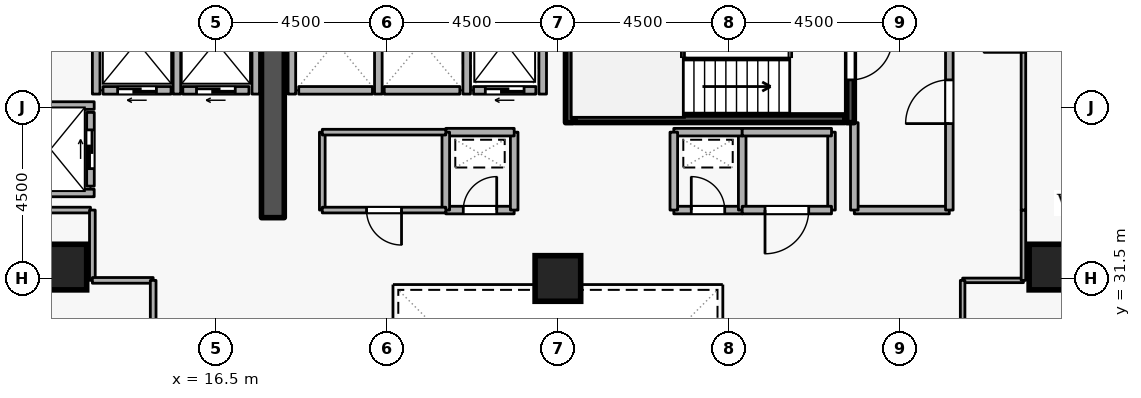
"""IFC4 building model, lengths in metres.
Left out: names, types, materials, properties, quantities, classifications, styles, units other than length and angle.
Written with IfcOpenShell. Run it as: python <this file> out.ifc"""

import sys

from ifc_helpers import new_model, si_unit, direction, frame, frame_2d, origin, origin_2d, place, context, subcontext, project, spatial, rectangle, extrude, element, fill, save


model = new_model("IFC4")
c1 = context("Model", 3, precision=1e-05, world=origin(), true_north=direction((0.0, 1.0)))
c2 = subcontext(c1, "Body", "Model", "MODEL_VIEW")
j1 = project(units=[si_unit("LENGTHUNIT", "METRE"), si_unit("PLANEANGLEUNIT", "RADIAN")], contexts=[c1])
p1 = place(None, origin())
s1 = spatial("IfcSite", under=j1, at=p1, CompositionType="ELEMENT")
p2 = place(p1, origin())
s2 = spatial("IfcBuilding", under=s1, at=p2, CompositionType="ELEMENT")
p3 = place(p2, frame((0.0, 0.0, 80.1)))
s3 = spatial("IfcBuildingStorey", under=s2, at=p3, CompositionType="ELEMENT", Elevation=80.1)
p4 = place(p3, frame((18.0, 33.1, 0.0), z_axis=(0.0, 0.0, 1.0), x_axis=(0.0, 1.0, 0.0)))
e1 = element("IfcWall", 1, at=p4, inside=s3, PredefinedType="SHEAR", context=c2, shape_type="SweptSolid", body=[
    extrude(rectangle(XDim=5.7, YDim=0.6, at=frame_2d((2.85, 0.0))), origin(), (0.0, 0.0, 1.0), 3.6),
])
for number, where, z_axis, x_axis in (
    (2, (12.5, 31.8, 0.0), (0.0, 0.0, 1.0), (1.0, 0.0, 0.0)),
    (3, (38.5, 31.8, 0.0), (0.0, 0.0, 1.0), (1.0, 0.0, 0.0)),
    (4, (25.5, 31.5, 0.0), (0.0, 0.0, 1.0), (1.0, 0.0, 0.0)),
):
    element("IfcColumn", number, at=place(p3, frame(where, z_axis=z_axis, x_axis=x_axis)), inside=s3, PredefinedType="COLUMN", context=c2, shape_type="SweptSolid", body=[
        extrude(rectangle(XDim=1.2, YDim=1.2, at=origin_2d()), origin(), (0.0, 0.0, 1.0), 3.6),
    ])
p5 = place(p3, frame((24.92, 36.45, 0.0), z_axis=(0.0, 0.0, 1.0), x_axis=(-1.0, 0.0, 0.0)))
e5 = element("IfcWall", 5, at=p5, inside=s3, PredefinedType="STANDARD", context=c2, shape_type="SweptSolid", body=[
    extrude(rectangle(XDim=1.64, YDim=0.2, at=frame_2d((0.82, 0.0))), origin(), (0.0, 0.0, 1.0), 3.34),
])
p6 = place(p5, frame((0.31, 0.0, 0.0)))
e6 = element("IfcOpeningElement", 6, at=p6, cuts=e5, PredefinedType="OPENING", context=c2, shape_type="SweptSolid", body=[
    extrude(rectangle(XDim=1.02, YDim=2.06, at=frame_2d((0.51, 1.03))), frame((0.0, 0.11, 0.0), z_axis=(0.0, -1.0, 0.0), x_axis=(1.0, 0.0, 0.0)), (0.0, 0.0, 1.0), 0.22),
])
p7 = place(p3, frame((22.92, 36.45, 0.0), z_axis=(0.0, 0.0, 1.0), x_axis=(-1.0, 0.0, 0.0)))
e7 = element("IfcWall", 7, at=p7, inside=s3, PredefinedType="STANDARD", context=c2, shape_type="SweptSolid", body=[
    extrude(rectangle(XDim=1.99, YDim=0.2, at=frame_2d((0.995, 0.0))), origin(), (0.0, 0.0, 1.0), 3.34),
])
p8 = place(p3, frame((20.62, 36.45, 0.0), z_axis=(0.0, 0.0, 1.0), x_axis=(-1.0, 0.0, 0.0)))
e8 = element("IfcWall", 8, at=p8, inside=s3, PredefinedType="STANDARD", context=c2, shape_type="SweptSolid", body=[
    extrude(rectangle(XDim=1.94, YDim=0.2, at=frame_2d((0.97, 0.0))), origin(), (0.0, 0.0, 1.0), 3.34),
])
p9 = place(p3, frame((17.37, 36.45, 0.0), z_axis=(0.0, 0.0, 1.0), x_axis=(-1.0, 0.0, 0.0)))
e9 = element("IfcWall", 9, at=p9, inside=s3, PredefinedType="STANDARD", context=c2, shape_type="SweptSolid", body=[
    extrude(rectangle(XDim=1.74, YDim=0.2, at=frame_2d((0.87, 0.0))), origin(), (0.0, 0.0, 1.0), 3.34),
])
p10 = place(p9, frame((0.36, 0.0, 0.0)))
e10 = element("IfcOpeningElement", 10, at=p10, cuts=e9, PredefinedType="OPENING", context=c2, shape_type="SweptSolid", body=[
    extrude(rectangle(XDim=1.02, YDim=2.06, at=frame_2d((0.51, 1.03))), frame((0.0, 0.11, 0.0), z_axis=(0.0, -1.0, 0.0), x_axis=(1.0, 0.0, 0.0)), (0.0, 0.0, 1.0), 0.22),
])
p11 = place(p3, frame((15.32, 36.45, 0.0), z_axis=(0.0, 0.0, 1.0), x_axis=(-1.0, 0.0, 0.0)))
e11 = element("IfcWall", 11, at=p11, inside=s3, PredefinedType="STANDARD", context=c2, shape_type="SweptSolid", body=[
    extrude(rectangle(XDim=1.79, YDim=0.2, at=frame_2d((0.895, 0.0))), origin(), (0.0, 0.0, 1.0), 3.34),
])
p12 = place(p11, frame((0.385, 0.0, 0.0)))
e12 = element("IfcOpeningElement", 12, at=p12, cuts=e11, PredefinedType="OPENING", context=c2, shape_type="SweptSolid", body=[
    extrude(rectangle(XDim=1.02, YDim=2.06, at=frame_2d((0.51, 1.03))), frame((0.0, 0.11, 0.0), z_axis=(0.0, -1.0, 0.0), x_axis=(1.0, 0.0, 0.0)), (0.0, 0.0, 1.0), 0.22),
])
p13 = place(p3, frame((13.2, 33.93, 0.0), z_axis=(0.0, 0.0, 1.0), x_axis=(0.0, 1.0, 0.0)))
e13 = element("IfcWall", 13, at=p13, inside=s3, PredefinedType="STANDARD", context=c2, shape_type="SweptSolid", body=[
    extrude(rectangle(XDim=1.94, YDim=0.2, at=frame_2d((0.97, 0.0))), origin(), (0.0, 0.0, 1.0), 3.34),
])
p14 = place(p13, frame((0.46, 0.0, 0.0)))
e14 = element("IfcOpeningElement", 14, at=p14, cuts=e13, PredefinedType="OPENING", context=c2, shape_type="SweptSolid", body=[
    extrude(rectangle(XDim=1.02, YDim=2.06, at=frame_2d((0.51, 1.03))), frame((0.0, 0.11, 0.0), z_axis=(0.0, -1.0, 0.0), x_axis=(1.0, 0.0, 0.0)), (0.0, 0.0, 1.0), 0.22),
])
for number, where, z_axis, x_axis in (
    (15, (25.1, 36.352, 0.0), (0.0, 0.0, 1.0), (0.0, 1.0, 0.0)),
    (16, (23.1, 36.352, 0.0), (0.0, 0.0, 1.0), (0.0, 1.0, 0.0)),
    (17, (20.775, 36.352, 0.0), (0.0, 0.0, 1.0), (0.0, 1.0, 0.0)),
    (18, (18.5, 36.352, 0.0), (0.0, 0.0, 1.0), (0.0, 1.0, 0.0)),
):
    element("IfcWall", number, at=place(p3, frame(where, z_axis=z_axis, x_axis=x_axis)), inside=s3, PredefinedType="STANDARD", context=c2, shape_type="SweptSolid", body=[
        extrude(rectangle(XDim=2.436, YDim=0.2, at=frame_2d((1.218, 0.0))), origin(), (0.0, 0.0, 1.0), 3.34),
    ])
p15 = place(p3, frame((17.55, 36.352, 0.0), z_axis=(0.0, 0.0, 1.0), x_axis=(0.0, 1.0, 0.0)))
e19 = element("IfcWall", 19, at=p15, inside=s3, PredefinedType="STANDARD", context=c2, shape_type="SweptSolid", body=[
    extrude(rectangle(XDim=2.636, YDim=0.2, at=frame_2d((1.318, 0.0))), origin(), (0.0, 0.0, 1.0), 2.545),
])
for number, where, z_axis, x_axis in (
    (20, (15.475, 36.352, 0.0), (0.0, 0.0, 1.0), (0.0, 1.0, 0.0)),
    (21, (13.35, 36.352, 0.0), (0.0, 0.0, 1.0), (0.0, 1.0, 0.0)),
):
    element("IfcWall", number, at=place(p3, frame(where, z_axis=z_axis, x_axis=x_axis)), inside=s3, PredefinedType="STANDARD", context=c2, shape_type="SweptSolid", body=[
        extrude(rectangle(XDim=2.636, YDim=0.2, at=frame_2d((1.318, 0.0))), origin(), (0.0, 0.0, 1.0), 3.34),
    ])
for number, where, z_axis, x_axis in (
    (22, (11.002, 36.05, 0.0), (0.0, 0.0, 1.0), (1.0, 0.0, 0.0)),
    (23, (11.002, 33.75, 0.0), (0.0, 0.0, 1.0), (1.0, 0.0, 0.0)),
):
    element("IfcWall", number, at=place(p3, frame(where, z_axis=z_axis, x_axis=x_axis)), inside=s3, PredefinedType="STANDARD", context=c2, shape_type="SweptSolid", body=[
        extrude(rectangle(XDim=2.296, YDim=0.2, at=frame_2d((1.148, 0.0))), origin(), (0.0, 0.0, 1.0), 3.34),
    ])
p16 = place(p3, frame((33.2, 38.95, 0.0), z_axis=(0.0, 0.0, 1.0), x_axis=(0.0, -1.0, 0.0)))
e24 = element("IfcWall", 24, at=p16, inside=s3, PredefinedType="SHEAR", context=c2, shape_type="SweptSolid", body=[
    extrude(rectangle(XDim=3.35, YDim=0.2, at=frame_2d((1.675, 0.0))), origin(), (0.0, 0.0, 1.0), 3.6),
])
p17 = place(p16, frame((1.125, 0.0, 0.0)))
e25 = element("IfcOpeningElement", 25, at=p17, cuts=e24, PredefinedType="OPENING", context=c2, shape_type="SweptSolid", body=[
    extrude(rectangle(XDim=1.1, YDim=2.1, at=frame_2d((0.55, 1.05))), frame((0.0, 0.11, 0.0), z_axis=(0.0, -1.0, 0.0), x_axis=(1.0, 0.0, 0.0)), (0.0, 0.0, 1.0), 0.22),
])
p18 = place(p3, frame((25.8, 35.6, 0.0), z_axis=(0.0, 0.0, 1.0), x_axis=(0.0, 1.0, 0.0)))
e26 = element("IfcWall", 26, at=p18, inside=s3, PredefinedType="SHEAR", context=c2, shape_type="SweptSolid", body=[
    extrude(rectangle(XDim=3.35, YDim=0.2, at=frame_2d((1.675, 0.0))), origin(), (0.0, 0.0, 1.0), 3.6),
])
p19 = place(p3, frame((25.95, 35.703, 0.0), z_axis=(0.0, 0.0, 1.0), x_axis=(1.0, 0.0, 0.0)))
e27 = element("IfcWall", 27, at=p19, inside=s3, PredefinedType="SHEAR", context=c2, shape_type="SweptSolid", body=[
    extrude(rectangle(XDim=7.1, YDim=0.2, at=frame_2d((3.55, 0.0))), origin(), (0.0, 0.0, 1.0), 3.6),
])
p20 = place(p3, frame((33.3, 33.3, 0.0), z_axis=(0.0, 0.0, 1.0), x_axis=(1.0, 0.0, 0.0)))
e28 = element("IfcWall", 28, at=p20, inside=s3, PredefinedType="STANDARD", context=c2, shape_type="SweptSolid", body=[
    extrude(rectangle(XDim=2.5, YDim=0.2, at=frame_2d((1.25, 0.0))), origin(), (0.0, 0.0, 1.0), 3.34),
])
p21 = place(p3, frame((35.8, 33.3, 0.0), z_axis=(0.0, 0.0, 1.0), x_axis=(0.0, 1.0, 0.0)))
e29 = element("IfcWall", 29, at=p21, inside=s3, PredefinedType="STANDARD", context=c2, shape_type="SweptSolid", body=[
    extrude(rectangle(XDim=5.7, YDim=0.2, at=frame_2d((2.85, 0.0))), origin(), (0.0, 0.0, 1.0), 3.34),
])
p22 = place(p21, frame((2.275, 0.0, 0.0)))
e30 = element("IfcOpeningElement", 30, at=p22, cuts=e29, PredefinedType="OPENING", context=c2, shape_type="SweptSolid", body=[
    extrude(rectangle(XDim=1.15, YDim=2.1, at=frame_2d((0.575, 1.05))), frame((0.0, 0.11, 0.0), z_axis=(0.0, -1.0, 0.0), x_axis=(1.0, 0.0, 0.0)), (0.0, 0.0, 1.0), 0.22),
])
p23 = place(p3, frame((33.3, 35.6, 0.0), z_axis=(0.0, 0.0, 1.0), x_axis=(0.0, -1.0, 0.0)))
e31 = element("IfcWall", 31, at=p23, inside=s3, PredefinedType="STANDARD", context=c2, shape_type="SweptSolid", body=[
    extrude(rectangle(XDim=2.3, YDim=0.2, at=frame_2d((1.15, 0.0))), origin(), (0.0, 0.0, 1.0), 2.545),
])
p24 = place(p3, frame((22.55, 33.3, 0.0), z_axis=(0.0, 0.0, 1.0), x_axis=(1.0, 0.0, 0.0)))
e32 = element("IfcWall", 32, at=p24, inside=s3, PredefinedType="STANDARD", context=c2, shape_type="SweptSolid", body=[
    extrude(rectangle(XDim=1.8, YDim=0.2, at=frame_2d((0.9, 0.0))), origin(), (0.0, 0.0, 1.0), 3.34),
])
p25 = place(p24, frame((0.46, 0.0, 0.0)))
e33 = element("IfcOpeningElement", 33, at=p25, cuts=e32, PredefinedType="OPENING", context=c2, shape_type="SweptSolid", body=[
    extrude(rectangle(XDim=0.88, YDim=2.04, at=frame_2d((0.44, 1.02))), frame((0.0, 0.11, 0.0), z_axis=(0.0, -1.0, 0.0), x_axis=(1.0, 0.0, 0.0)), (0.0, 0.0, 1.0), 0.22),
])
p26 = place(p3, frame((24.35, 33.3, 0.0), z_axis=(0.0, 0.0, 1.0), x_axis=(0.0, 1.0, 0.0)))
e34 = element("IfcWall", 34, at=p26, inside=s3, PredefinedType="STANDARD", context=c2, shape_type="SweptSolid", body=[
    extrude(rectangle(XDim=2.05, YDim=0.2, at=frame_2d((1.025, 0.0))), origin(), (0.0, 0.0, 1.0), 3.34),
])
p27 = place(p3, frame((24.35, 35.35, 0.0), z_axis=(0.0, 0.0, 1.0), x_axis=(-1.0, 0.0, 0.0)))
e35 = element("IfcWall", 35, at=p27, inside=s3, PredefinedType="STANDARD", context=c2, shape_type="SweptSolid", body=[
    extrude(rectangle(XDim=1.8, YDim=0.2, at=frame_2d((0.9, 0.0))), origin(), (0.0, 0.0, 1.0), 3.34),
])
p28 = place(p3, frame((22.55, 35.35, 0.0), z_axis=(0.0, 0.0, 1.0), x_axis=(0.0, -1.0, 0.0)))
e36 = element("IfcWall", 36, at=p28, inside=s3, PredefinedType="STANDARD", context=c2, shape_type="SweptSolid", body=[
    extrude(rectangle(XDim=2.05, YDim=0.2, at=frame_2d((1.025, 0.0))), origin(), (0.0, 0.0, 1.0), 3.34),
])
p29 = place(p3, frame((28.55, 33.3, 0.0), z_axis=(0.0, 0.0, 1.0), x_axis=(1.0, 0.0, 0.0)))
e37 = element("IfcWall", 37, at=p29, inside=s3, PredefinedType="STANDARD", context=c2, shape_type="SweptSolid", body=[
    extrude(rectangle(XDim=1.8, YDim=0.2, at=frame_2d((0.9, 0.0))), origin(), (0.0, 0.0, 1.0), 3.34),
])
p30 = place(p29, frame((0.46, 0.0, 0.0)))
e38 = element("IfcOpeningElement", 38, at=p30, cuts=e37, PredefinedType="OPENING", context=c2, shape_type="SweptSolid", body=[
    extrude(rectangle(XDim=0.88, YDim=2.04, at=frame_2d((0.44, 1.02))), frame((0.0, 0.11, 0.0), z_axis=(0.0, -1.0, 0.0), x_axis=(1.0, 0.0, 0.0)), (0.0, 0.0, 1.0), 0.22),
])
p31 = place(p3, frame((30.35, 33.3, 0.0), z_axis=(0.0, 0.0, 1.0), x_axis=(0.0, 1.0, 0.0)))
e39 = element("IfcWall", 39, at=p31, inside=s3, PredefinedType="STANDARD", context=c2, shape_type="SweptSolid", body=[
    extrude(rectangle(XDim=2.05, YDim=0.2, at=frame_2d((1.025, 0.0))), origin(), (0.0, 0.0, 1.0), 3.34),
])
p32 = place(p3, frame((30.35, 35.35, 0.0), z_axis=(0.0, 0.0, 1.0), x_axis=(-1.0, 0.0, 0.0)))
e40 = element("IfcWall", 40, at=p32, inside=s3, PredefinedType="STANDARD", context=c2, shape_type="SweptSolid", body=[
    extrude(rectangle(XDim=1.8, YDim=0.2, at=frame_2d((0.9, 0.0))), origin(), (0.0, 0.0, 1.0), 3.34),
])
p33 = place(p3, frame((28.55, 35.35, 0.0), z_axis=(0.0, 0.0, 1.0), x_axis=(0.0, -1.0, 0.0)))
e41 = element("IfcWall", 41, at=p33, inside=s3, PredefinedType="STANDARD", context=c2, shape_type="SweptSolid", body=[
    extrude(rectangle(XDim=2.05, YDim=0.2, at=frame_2d((1.025, 0.0))), origin(), (0.0, 0.0, 1.0), 3.34),
])
p34 = place(p3, frame((32.7, 35.35, 0.0), z_axis=(0.0, 0.0, 1.0), x_axis=(0.0, -1.0, 0.0)))
e42 = element("IfcWall", 42, at=p34, inside=s3, PredefinedType="STANDARD", context=c2, shape_type="SweptSolid", body=[
    extrude(rectangle(XDim=2.05, YDim=0.2, at=frame_2d((1.025, 0.0))), origin(), (0.0, 0.0, 1.0), 2.545),
])
p35 = place(p3, frame((32.7, 33.3, 0.0), z_axis=(0.0, 0.0, 1.0), x_axis=(-1.0, 0.0, 0.0)))
e43 = element("IfcWall", 43, at=p35, inside=s3, PredefinedType="STANDARD", context=c2, shape_type="SweptSolid", body=[
    extrude(rectangle(XDim=2.35, YDim=0.2, at=frame_2d((1.175, 0.0))), origin(), (0.0, 0.0, 1.0), 3.34),
])
p36 = place(p35, frame((0.6, 0.0, 0.0)))
e44 = element("IfcOpeningElement", 44, at=p36, cuts=e43, PredefinedType="OPENING", context=c2, shape_type="SweptSolid", body=[
    extrude(rectangle(XDim=1.15, YDim=2.1, at=frame_2d((0.575, 1.05))), frame((0.0, 0.11, 0.0), z_axis=(0.0, -1.0, 0.0), x_axis=(1.0, 0.0, 0.0)), (0.0, 0.0, 1.0), 0.22),
])
p37 = place(p3, frame((30.35, 35.35, 0.0), z_axis=(0.0, 0.0, 1.0), x_axis=(1.0, 0.0, 0.0)))
e45 = element("IfcWall", 45, at=p37, inside=s3, PredefinedType="STANDARD", context=c2, shape_type="SweptSolid", body=[
    extrude(rectangle(XDim=2.35, YDim=0.2, at=frame_2d((1.175, 0.0))), origin(), (0.0, 0.0, 1.0), 3.34),
])
p38 = place(p3, frame((19.3, 33.3, 0.0), z_axis=(0.0, 0.0, 1.0), x_axis=(0.0, 1.0, 0.0)))
e46 = element("IfcWall", 46, at=p38, inside=s3, PredefinedType="PARTITIONING", context=c2, shape_type="SweptSolid", body=[
    extrude(rectangle(XDim=2.05, YDim=0.15, at=frame_2d((1.025, 0.0))), origin(), (0.0, 0.0, 1.0), 3.34),
])
p39 = place(p3, frame((19.3, 35.35, 0.0), z_axis=(0.0, 0.0, 1.0), x_axis=(1.0, 0.0, 0.0)))
e47 = element("IfcWall", 47, at=p39, inside=s3, PredefinedType="PARTITIONING", context=c2, shape_type="SweptSolid", body=[
    extrude(rectangle(XDim=3.25, YDim=0.15, at=frame_2d((1.625, 0.0))), origin(), (0.0, 0.0, 1.0), 3.34),
])
p40 = place(p3, frame((22.55, 33.3, 0.0), z_axis=(0.0, 0.0, 1.0), x_axis=(-1.0, 0.0, 0.0)))
e48 = element("IfcWall", 48, at=p40, inside=s3, PredefinedType="PARTITIONING", context=c2, shape_type="SweptSolid", body=[
    extrude(rectangle(XDim=3.25, YDim=0.15, at=frame_2d((1.625, 0.0))), origin(), (0.0, 0.0, 1.0), 3.34),
])
p41 = place(p40, frame((1.165, 0.0, 0.0)))
e49 = element("IfcOpeningElement", 49, at=p41, cuts=e48, PredefinedType="OPENING", context=c2, shape_type="SweptSolid", body=[
    extrude(rectangle(XDim=0.92, YDim=2.08, at=frame_2d((0.46, 1.04))), frame((0.0, 0.085, 0.0), z_axis=(0.0, -1.0, 0.0), x_axis=(1.0, 0.0, 0.0)), (0.0, 0.0, 1.0), 0.17),
])
p42 = place(p3, frame((10.9, 33.3, 0.0), z_axis=(0.0, 0.0, 1.0), x_axis=(1.0, 0.0, 0.0)))
e50 = element("IfcWall", 50, at=p42, inside=s3, PredefinedType="PARTITIONING", context=c2, shape_type="SweptSolid", body=[
    extrude(rectangle(XDim=2.3, YDim=0.15, at=frame_2d((1.15, 0.0))), origin(), (0.0, 0.0, 1.0), 3.34),
])
p43 = place(p3, frame((13.25, 33.3, 0.0), z_axis=(0.0, 0.0, 1.0), x_axis=(0.0, -1.0, 0.0)))
e51 = element("IfcWall", 51, at=p43, inside=s3, PredefinedType="PARTITIONING", context=c2, shape_type="SweptSolid", body=[
    extrude(rectangle(XDim=1.85, YDim=0.15, at=frame_2d((0.925, 0.0))), origin(), (0.0, 0.0, 1.0), 3.34),
])
p44 = place(p3, frame((13.25, 31.45, 0.0), z_axis=(0.0, 0.0, 1.0), x_axis=(1.0, 0.0, 0.0)))
e52 = element("IfcWall", 52, at=p44, inside=s3, PredefinedType="PARTITIONING", context=c2, shape_type="SweptSolid", body=[
    extrude(rectangle(XDim=1.6, YDim=0.15, at=frame_2d((0.8, 0.0))), origin(), (0.0, 0.0, 1.0), 3.34),
])
p45 = place(p3, frame((14.85, 31.45, 0.0), z_axis=(0.0, 0.0, 1.0), x_axis=(0.0, -1.0, 0.0)))
e53 = element("IfcWall", 53, at=p45, inside=s3, PredefinedType="PARTITIONING", context=c2, shape_type="SweptSolid", body=[
    extrude(rectangle(XDim=4.45, YDim=0.15, at=frame_2d((2.225, 0.0))), origin(), (0.0, 0.0, 1.0), 3.34),
])
p46 = place(p45, frame((1.575, 0.0, 0.0)))
e54 = element("IfcOpeningElement", 54, at=p46, cuts=e53, PredefinedType="OPENING", context=c2, shape_type="SweptSolid", body=[
    extrude(rectangle(XDim=1.3, YDim=2.12, at=frame_2d((0.65, 1.06))), frame((0.0, 0.085, 0.0), z_axis=(0.0, -1.0, 0.0), x_axis=(1.0, 0.0, 0.0)), (0.0, 0.0, 1.0), 0.17),
])
p47 = place(p3, frame((36.15, 31.45, 0.0), z_axis=(0.0, 0.0, 1.0), x_axis=(1.0, 0.0, 0.0)))
e55 = element("IfcWall", 55, at=p47, inside=s3, PredefinedType="PARTITIONING", context=c2, shape_type="SweptSolid", body=[
    extrude(rectangle(XDim=1.6, YDim=0.12, at=frame_2d((0.8, 0.0))), origin(), (0.0, 0.0, 1.0), 3.34),
])
p48 = place(p3, frame((37.75, 31.45, 0.0), z_axis=(0.0, 0.0, 1.0), x_axis=(0.0, 1.0, 0.0)))
e56 = element("IfcWall", 56, at=p48, inside=s3, PredefinedType="PARTITIONING", context=c2, shape_type="SweptSolid", body=[
    extrude(rectangle(XDim=1.85, YDim=0.12, at=frame_2d((0.925, 0.0))), origin(), (0.0, 0.0, 1.0), 3.34),
])
p49 = place(p3, frame((37.75, 33.3, 0.0), z_axis=(0.0, 0.0, 1.0), x_axis=(0.0, 1.0, 0.0)))
e57 = element("IfcWall", 57, at=p49, inside=s3, PredefinedType="PARTITIONING", context=c2, shape_type="SweptSolid", body=[
    extrude(rectangle(XDim=9.35, YDim=0.12, at=frame_2d((4.675, 0.0))), origin(), (0.0, 0.0, 1.0), 3.34),
])
p50 = place(p49, frame((4.15, 0.0, 0.0)))
e58 = element("IfcOpeningElement", 58, at=p50, cuts=e57, PredefinedType="OPENING", context=c2, shape_type="SweptSolid", body=[
    extrude(rectangle(XDim=1.05, YDim=2.1, at=frame_2d((0.525, 1.05))), frame((0.0, 0.07, 0.0), z_axis=(0.0, -1.0, 0.0), x_axis=(1.0, 0.0, 0.0)), (0.0, 0.0, 1.0), 0.14),
])
p51 = place(p3, frame((36.15, 27.0, 0.0), z_axis=(0.0, 0.0, 1.0), x_axis=(0.0, 1.0, 0.0)))
e59 = element("IfcWall", 59, at=p51, inside=s3, PredefinedType="PARTITIONING", context=c2, shape_type="SweptSolid", body=[
    extrude(rectangle(XDim=4.45, YDim=0.12, at=frame_2d((2.225, 0.0))), origin(), (0.0, 0.0, 1.0), 3.34),
])
p52 = place(p6, origin())
e60 = element("IfcDoor", 60, at=p52, inside=s3, OperationType="SLIDING_TO_LEFT", PredefinedType="DOOR", context=c2, shape_type="SweptSolid", body=[
    extrude(rectangle(XDim=1.02, YDim=2.06, at=frame_2d((0.51, 1.03))), frame((0.0, 0.025, 0.0), z_axis=(0.0, -1.0, 0.0), x_axis=(1.0, 0.0, 0.0)), (0.0, 0.0, 1.0), 0.05),
])
fill(e6, e60)
p53 = place(p10, origin())
e61 = element("IfcDoor", 61, at=p53, inside=s3, OperationType="SLIDING_TO_LEFT", PredefinedType="DOOR", context=c2, shape_type="SweptSolid", body=[
    extrude(rectangle(XDim=1.02, YDim=2.06, at=frame_2d((0.51, 1.03))), frame((0.0, 0.025, 0.0), z_axis=(0.0, -1.0, 0.0), x_axis=(1.0, 0.0, 0.0)), (0.0, 0.0, 1.0), 0.05),
])
fill(e10, e61)
p54 = place(p12, origin())
e62 = element("IfcDoor", 62, at=p54, inside=s3, OperationType="SLIDING_TO_LEFT", PredefinedType="DOOR", context=c2, shape_type="SweptSolid", body=[
    extrude(rectangle(XDim=1.02, YDim=2.06, at=frame_2d((0.51, 1.03))), frame((0.0, 0.025, 0.0), z_axis=(0.0, -1.0, 0.0), x_axis=(1.0, 0.0, 0.0)), (0.0, 0.0, 1.0), 0.05),
])
fill(e12, e62)
p55 = place(p14, origin())
e63 = element("IfcDoor", 63, at=p55, inside=s3, OperationType="SLIDING_TO_LEFT", PredefinedType="DOOR", context=c2, shape_type="SweptSolid", body=[
    extrude(rectangle(XDim=1.02, YDim=2.06, at=frame_2d((0.51, 1.03))), frame((0.0, 0.025, 0.0), z_axis=(0.0, -1.0, 0.0), x_axis=(1.0, 0.0, 0.0)), (0.0, 0.0, 1.0), 0.05),
])
fill(e14, e63)
p56 = place(p17, origin())
e64 = element("IfcDoor", 64, at=p56, inside=s3, OperationType="SINGLE_SWING_LEFT", PredefinedType="DOOR", context=c2, shape_type="SweptSolid", body=[
    extrude(rectangle(XDim=1.1, YDim=2.1, at=frame_2d((0.55, 1.05))), frame((0.0, 0.025, 0.0), z_axis=(0.0, -1.0, 0.0), x_axis=(1.0, 0.0, 0.0)), (0.0, 0.0, 1.0), 0.05),
])
fill(e25, e64)
p57 = place(p22, origin())
e65 = element("IfcDoor", 65, at=p57, inside=s3, OperationType="SINGLE_SWING_LEFT", PredefinedType="DOOR", context=c2, shape_type="SweptSolid", body=[
    extrude(rectangle(XDim=1.15, YDim=2.1, at=frame_2d((0.575, 1.05))), frame((0.0, 0.025, 0.0), z_axis=(0.0, -1.0, 0.0), x_axis=(1.0, 0.0, 0.0)), (0.0, 0.0, 1.0), 0.05),
])
fill(e30, e65)
p58 = place(p25, origin())
e66 = element("IfcDoor", 66, at=p58, inside=s3, OperationType="SINGLE_SWING_RIGHT", PredefinedType="DOOR", context=c2, shape_type="SweptSolid", body=[
    extrude(rectangle(XDim=0.88, YDim=2.04, at=frame_2d((0.44, 1.02))), frame((0.0, 0.025, 0.0), z_axis=(0.0, -1.0, 0.0), x_axis=(1.0, 0.0, 0.0)), (0.0, 0.0, 1.0), 0.05),
])
fill(e33, e66)
p59 = place(p30, origin())
e67 = element("IfcDoor", 67, at=p59, inside=s3, OperationType="SINGLE_SWING_LEFT", PredefinedType="DOOR", context=c2, shape_type="SweptSolid", body=[
    extrude(rectangle(XDim=0.88, YDim=2.04, at=frame_2d((0.44, 1.02))), frame((0.0, 0.025, 0.0), z_axis=(0.0, -1.0, 0.0), x_axis=(1.0, 0.0, 0.0)), (0.0, 0.0, 1.0), 0.05),
])
fill(e38, e67)
p60 = place(p41, origin())
e68 = element("IfcDoor", 68, at=p60, inside=s3, OperationType="SINGLE_SWING_LEFT", PredefinedType="DOOR", context=c2, shape_type="SweptSolid", body=[
    extrude(rectangle(XDim=0.92, YDim=2.08, at=frame_2d((0.46, 1.04))), frame((0.0, 0.025, 0.0), z_axis=(0.0, -1.0, 0.0), x_axis=(1.0, 0.0, 0.0)), (0.0, 0.0, 1.0), 0.05),
])
fill(e49, e68)
p61 = place(p36, origin())
e69 = element("IfcDoor", 69, at=p61, inside=s3, OperationType="SINGLE_SWING_RIGHT", PredefinedType="DOOR", context=c2, shape_type="SweptSolid", body=[
    extrude(rectangle(XDim=1.15, YDim=2.1, at=frame_2d((0.575, 1.05))), frame((0.0, 0.025, 0.0), z_axis=(0.0, -1.0, 0.0), x_axis=(1.0, 0.0, 0.0)), (0.0, 0.0, 1.0), 0.05),
])
fill(e44, e69)
p62 = place(p50, origin())
e70 = element("IfcDoor", 70, at=p62, inside=s3, OperationType="SINGLE_SWING_LEFT", PredefinedType="DOOR", context=c2, shape_type="SweptSolid", body=[
    extrude(rectangle(XDim=1.05, YDim=2.1, at=frame_2d((0.525, 1.05))), frame((0.0, 0.025, 0.0), z_axis=(0.0, -1.0, 0.0), x_axis=(1.0, 0.0, 0.0)), (0.0, 0.0, 1.0), 0.05),
])
fill(e58, e70)
save(model, sys.argv[1])
